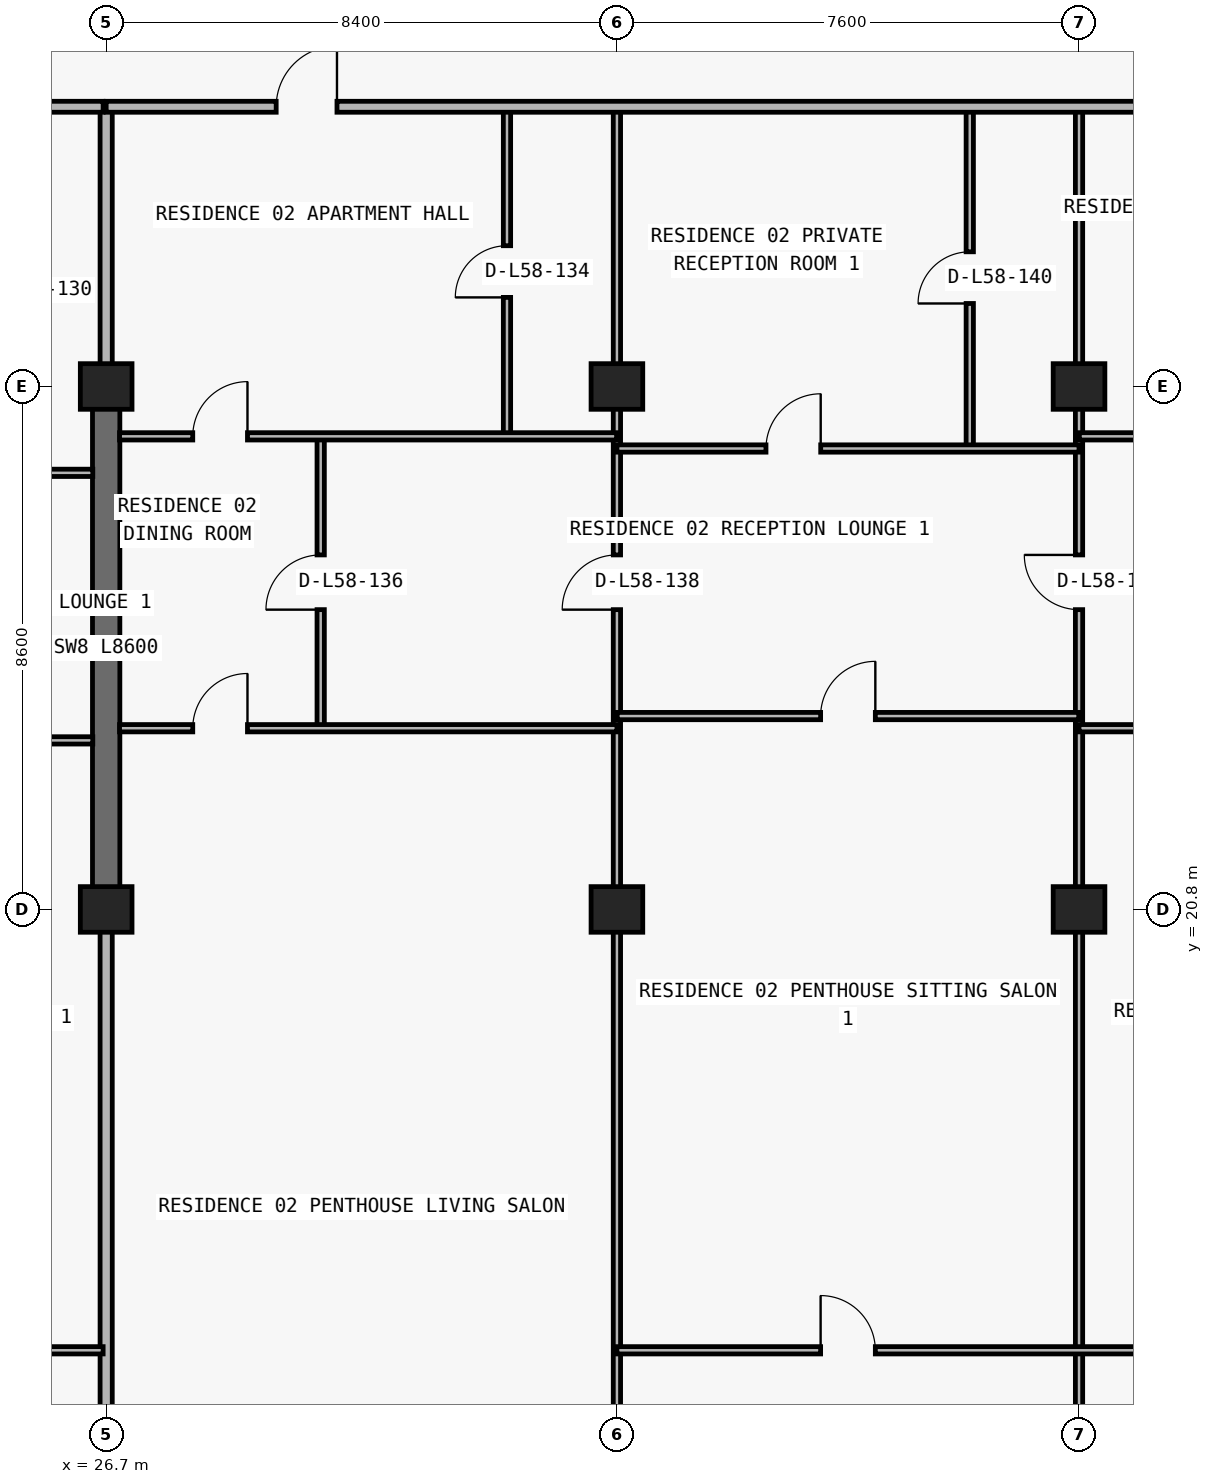
"""IFC4 building model, lengths in metres.
Left out: names, types, materials, properties, quantities, classifications, styles, units other than length and angle.
Written with IfcOpenShell. Run it as: python <this file> out.ifc"""

import sys

from ifc_helpers import new_model, si_unit, direction, frame, frame_2d, origin, origin_2d, place, context, subcontext, project, spatial, rectangle, extrude, element, fill, save


model = new_model("IFC4")
c1 = context("Model", 3, precision=1e-05, world=origin(), true_north=direction((0.0, 1.0)))
c2 = subcontext(c1, "Body", "Model", "MODEL_VIEW")
j1 = project(units=[si_unit("LENGTHUNIT", "METRE"), si_unit("PLANEANGLEUNIT", "RADIAN")], contexts=[c1])
p1 = place(None, origin())
s1 = spatial("IfcSite", under=j1, at=p1, CompositionType="ELEMENT")
p2 = place(p1, origin())
s2 = spatial("IfcBuilding", under=s1, at=p2, CompositionType="ELEMENT")
p3 = place(p2, frame((0.0, 0.0, 208.2)))
s3 = spatial("IfcBuildingStorey", under=s2, at=p3, CompositionType="ELEMENT", Elevation=208.2)
for number, where, z_axis, x_axis in (
    (1, (26.7, 20.8, 0.0), (0.0, 0.0, 1.0), (1.0, 0.0, 0.0)),
    (2, (35.1, 20.8, 0.0), (0.0, 0.0, 1.0), (1.0, 0.0, 0.0)),
    (3, (42.7, 20.8, 0.0), (0.0, 0.0, 1.0), (1.0, 0.0, 0.0)),
    (4, (26.7, 29.4, 0.0), (0.0, 0.0, 1.0), (1.0, 0.0, 0.0)),
    (5, (35.1, 29.4, 0.0), (0.0, 0.0, 1.0), (1.0, 0.0, 0.0)),
    (6, (42.7, 29.4, 0.0), (0.0, 0.0, 1.0), (1.0, 0.0, 0.0)),
):
    element("IfcColumn", number, at=place(p3, frame(where, z_axis=z_axis, x_axis=x_axis)), inside=s3, PredefinedType="COLUMN", context=c2, shape_type="SweptSolid", body=[
        extrude(rectangle(XDim=0.85, YDim=0.75, at=origin_2d()), origin(), (0.0, 0.0, 1.0), 3.05),
    ])
p4 = place(p3, frame((26.7, 20.8, 0.0), z_axis=(0.0, 0.0, 1.0), x_axis=(0.0, 1.0, 0.0)))
e7 = element("IfcWall", 7, at=p4, inside=s3, PredefinedType="SHEAR", context=c2, shape_type="SweptSolid", body=[
    extrude(rectangle(XDim=8.6, YDim=0.45, at=frame_2d((4.3, 0.0))), origin(), (0.0, 0.0, 1.0), 3.05),
])
p5 = place(p3, frame((26.7, 11.24, 0.0), z_axis=(0.0, 0.0, 1.0), x_axis=(0.0, 1.0, 0.0)))
e8 = element("IfcWall", 8, at=p5, inside=s3, PredefinedType="PARTITIONING", context=c2, shape_type="SweptSolid", body=[
    extrude(rectangle(XDim=9.555, YDim=0.2, at=frame_2d((4.777, 0.0))), origin(), (0.0, 0.0, 1.0), 2.263),
])
p6 = place(p3, frame((26.7, 29.405, 0.0), z_axis=(0.0, 0.0, 1.0), x_axis=(0.0, 1.0, 0.0)))
e9 = element("IfcWall", 9, at=p6, inside=s3, PredefinedType="PARTITIONING", context=c2, shape_type="SweptSolid", body=[
    extrude(rectangle(XDim=4.595, YDim=0.2, at=frame_2d((2.297, 0.0))), origin(), (0.0, 0.0, 1.0), 2.335),
])
p7 = place(p3, frame((30.228, 23.78, 0.0), z_axis=(0.0, 0.0, 1.0), x_axis=(0.0, 1.0, 0.0)))
e10 = element("IfcWall", 10, at=p7, inside=s3, PredefinedType="PARTITIONING", context=c2, shape_type="SweptSolid", body=[
    extrude(rectangle(XDim=4.8, YDim=0.12, at=frame_2d((2.4, 0.0))), origin(), (0.0, 0.0, 1.0), 3.05),
])
p8 = place(p7, frame((1.95, 0.0, 0.0)))
e11 = element("IfcOpeningElement", 11, at=p8, cuts=e10, PredefinedType="OPENING", context=c2, shape_type="SweptSolid", body=[
    extrude(rectangle(XDim=0.9, YDim=2.15, at=frame_2d((0.45, 1.075))), frame((0.0, 0.07, 0.0), z_axis=(0.0, -1.0, 0.0), x_axis=(1.0, 0.0, 0.0)), (0.0, 0.0, 1.0), 0.14),
])
p9 = place(p3, frame((33.292, 28.58, 0.0), z_axis=(0.0, 0.0, 1.0), x_axis=(0.0, 1.0, 0.0)))
e12 = element("IfcWall", 12, at=p9, inside=s3, PredefinedType="PARTITIONING", context=c2, shape_type="SweptSolid", body=[
    extrude(rectangle(XDim=5.42, YDim=0.12, at=frame_2d((2.71, 0.0))), origin(), (0.0, 0.0, 1.0), 3.05),
])
p10 = place(p9, frame((2.285, 0.0, 0.0)))
e13 = element("IfcOpeningElement", 13, at=p10, cuts=e12, PredefinedType="OPENING", context=c2, shape_type="SweptSolid", body=[
    extrude(rectangle(XDim=0.85, YDim=2.1, at=frame_2d((0.425, 1.05))), frame((0.0, 0.07, 0.0), z_axis=(0.0, -1.0, 0.0), x_axis=(1.0, 0.0, 0.0)), (0.0, 0.0, 1.0), 0.14),
])
p11 = place(p3, frame((35.1, 11.24, 0.0), z_axis=(0.0, 0.0, 1.0), x_axis=(0.0, 1.0, 0.0)))
e14 = element("IfcWall", 14, at=p11, inside=s3, PredefinedType="PARTITIONING", context=c2, shape_type="SweptSolid", body=[
    extrude(rectangle(XDim=22.76, YDim=0.12, at=frame_2d((11.38, 0.0))), origin(), (0.0, 0.0, 1.0), 2.263),
])
p12 = place(p11, frame((14.49, 0.0, 0.0)))
e15 = element("IfcOpeningElement", 15, at=p12, cuts=e14, PredefinedType="OPENING", context=c2, shape_type="SweptSolid", body=[
    extrude(rectangle(XDim=0.9, YDim=2.15, at=frame_2d((0.45, 1.075))), frame((0.0, 0.07, 0.0), z_axis=(0.0, -1.0, 0.0), x_axis=(1.0, 0.0, 0.0)), (0.0, 0.0, 1.0), 0.14),
])
p13 = place(p3, frame((40.903, 28.38, 0.0), z_axis=(0.0, 0.0, 1.0), x_axis=(0.0, 1.0, 0.0)))
e16 = element("IfcWall", 16, at=p13, inside=s3, PredefinedType="PARTITIONING", context=c2, shape_type="SweptSolid", body=[
    extrude(rectangle(XDim=5.62, YDim=0.12, at=frame_2d((2.81, 0.0))), origin(), (0.0, 0.0, 1.0), 3.05),
])
p14 = place(p13, frame((2.385, 0.0, 0.0)))
e17 = element("IfcOpeningElement", 17, at=p14, cuts=e16, PredefinedType="OPENING", context=c2, shape_type="SweptSolid", body=[
    extrude(rectangle(XDim=0.85, YDim=2.1, at=frame_2d((0.425, 1.05))), frame((0.0, 0.07, 0.0), z_axis=(0.0, -1.0, 0.0), x_axis=(1.0, 0.0, 0.0)), (0.0, 0.0, 1.0), 0.14),
])
p15 = place(p3, frame((42.7, 11.24, 0.0), z_axis=(0.0, 0.0, 1.0), x_axis=(0.0, 1.0, 0.0)))
e18 = element("IfcWall", 18, at=p15, inside=s3, PredefinedType="PARTITIONING", context=c2, shape_type="SweptSolid", body=[
    extrude(rectangle(XDim=22.76, YDim=0.12, at=frame_2d((11.38, 0.0))), origin(), (0.0, 0.0, 1.0), 2.263),
])
p16 = place(p15, frame((14.49, 0.0, 0.0)))
e19 = element("IfcOpeningElement", 19, at=p16, cuts=e18, PredefinedType="OPENING", context=c2, shape_type="SweptSolid", body=[
    extrude(rectangle(XDim=0.9, YDim=2.15, at=frame_2d((0.45, 1.075))), frame((0.0, 0.07, 0.0), z_axis=(0.0, -1.0, 0.0), x_axis=(1.0, 0.0, 0.0)), (0.0, 0.0, 1.0), 0.14),
])
p17 = place(p3, frame((18.3, 13.55, 0.0), z_axis=(0.0, 0.0, 1.0), x_axis=(1.0, 0.0, 0.0)))
e20 = element("IfcWall", 20, at=p17, inside=s3, PredefinedType="PARTITIONING", context=c2, shape_type="SweptSolid", body=[
    extrude(rectangle(XDim=8.35, YDim=0.12, at=frame_2d((4.175, 0.0))), origin(), (0.0, 0.0, 1.0), 3.05),
])
p18 = place(p17, frame((3.725, 0.0, 0.0)))
e21 = element("IfcOpeningElement", 21, at=p18, cuts=e20, PredefinedType="OPENING", context=c2, shape_type="SweptSolid", body=[
    extrude(rectangle(XDim=0.9, YDim=2.15, at=frame_2d((0.45, 1.075))), frame((0.0, 0.07, 0.0), z_axis=(0.0, -1.0, 0.0), x_axis=(1.0, 0.0, 0.0)), (0.0, 0.0, 1.0), 0.14),
])
p19 = place(p3, frame((35.1, 13.55, 0.0), z_axis=(0.0, 0.0, 1.0), x_axis=(1.0, 0.0, 0.0)))
e22 = element("IfcWall", 22, at=p19, inside=s3, PredefinedType="PARTITIONING", context=c2, shape_type="SweptSolid", body=[
    extrude(rectangle(XDim=16.0, YDim=0.12, at=frame_2d((8.0, 0.0))), origin(), (0.0, 0.0, 1.0), 3.05),
])
p20 = place(p19, frame((3.35, 0.0, 0.0)))
e23 = element("IfcOpeningElement", 23, at=p20, cuts=e22, PredefinedType="OPENING", context=c2, shape_type="SweptSolid", body=[
    extrude(rectangle(XDim=0.9, YDim=2.15, at=frame_2d((0.45, 1.075))), frame((0.0, 0.07, 0.0), z_axis=(0.0, -1.0, 0.0), x_axis=(1.0, 0.0, 0.0)), (0.0, 0.0, 1.0), 0.14),
])
p21 = place(p19, frame((11.35, 0.0, 0.0)))
e24 = element("IfcOpeningElement", 24, at=p21, cuts=e22, PredefinedType="OPENING", context=c2, shape_type="SweptSolid", body=[
    extrude(rectangle(XDim=0.9, YDim=2.15, at=frame_2d((0.45, 1.075))), frame((0.0, 0.07, 0.0), z_axis=(0.0, -1.0, 0.0), x_axis=(1.0, 0.0, 0.0)), (0.0, 0.0, 1.0), 0.14),
])
p22 = place(p3, frame((18.305, 23.58, 0.0), z_axis=(0.0, 0.0, 1.0), x_axis=(1.0, 0.0, 0.0)))
e25 = element("IfcWall", 25, at=p22, inside=s3, PredefinedType="PARTITIONING", context=c2, shape_type="SweptSolid", body=[
    extrude(rectangle(XDim=8.175, YDim=0.12, at=frame_2d((4.087, 0.0))), origin(), (0.0, 0.0, 1.0), 3.05),
])
p23 = place(p22, frame((3.637, 0.0, 0.0)))
e26 = element("IfcOpeningElement", 26, at=p23, cuts=e25, PredefinedType="OPENING", context=c2, shape_type="SweptSolid", body=[
    extrude(rectangle(XDim=0.9, YDim=2.15, at=frame_2d((0.45, 1.075))), frame((0.0, 0.07, 0.0), z_axis=(0.0, -1.0, 0.0), x_axis=(1.0, 0.0, 0.0)), (0.0, 0.0, 1.0), 0.14),
])
p24 = place(p3, frame((26.92, 23.78, 0.0), z_axis=(0.0, 0.0, 1.0), x_axis=(1.0, 0.0, 0.0)))
e27 = element("IfcWall", 27, at=p24, inside=s3, PredefinedType="PARTITIONING", context=c2, shape_type="SweptSolid", body=[
    extrude(rectangle(XDim=8.18, YDim=0.12, at=frame_2d((4.09, 0.0))), origin(), (0.0, 0.0, 1.0), 3.05),
])
p25 = place(p24, frame((1.204, 0.0, 0.0)))
e28 = element("IfcOpeningElement", 28, at=p25, cuts=e27, PredefinedType="OPENING", context=c2, shape_type="SweptSolid", body=[
    extrude(rectangle(XDim=0.9, YDim=2.15, at=frame_2d((0.45, 1.075))), frame((0.0, 0.07, 0.0), z_axis=(0.0, -1.0, 0.0), x_axis=(1.0, 0.0, 0.0)), (0.0, 0.0, 1.0), 0.14),
])
p26 = place(p3, frame((42.7, 23.78, 0.0), z_axis=(0.0, 0.0, 1.0), x_axis=(1.0, 0.0, 0.0)))
e29 = element("IfcWall", 29, at=p26, inside=s3, PredefinedType="PARTITIONING", context=c2, shape_type="SweptSolid", body=[
    extrude(rectangle(XDim=8.18, YDim=0.12, at=frame_2d((4.09, 0.0))), origin(), (0.0, 0.0, 1.0), 3.05),
])
p27 = place(p26, frame((3.64, 0.0, 0.0)))
e30 = element("IfcOpeningElement", 30, at=p27, cuts=e29, PredefinedType="OPENING", context=c2, shape_type="SweptSolid", body=[
    extrude(rectangle(XDim=0.9, YDim=2.15, at=frame_2d((0.45, 1.075))), frame((0.0, 0.07, 0.0), z_axis=(0.0, -1.0, 0.0), x_axis=(1.0, 0.0, 0.0)), (0.0, 0.0, 1.0), 0.14),
])
p28 = place(p3, frame((35.105, 23.98, 0.0), z_axis=(0.0, 0.0, 1.0), x_axis=(1.0, 0.0, 0.0)))
e31 = element("IfcWall", 31, at=p28, inside=s3, PredefinedType="PARTITIONING", context=c2, shape_type="SweptSolid", body=[
    extrude(rectangle(XDim=7.59, YDim=0.12, at=frame_2d((3.795, 0.0))), origin(), (0.0, 0.0, 1.0), 3.05),
])
p29 = place(p28, frame((3.345, 0.0, 0.0)))
e32 = element("IfcOpeningElement", 32, at=p29, cuts=e31, PredefinedType="OPENING", context=c2, shape_type="SweptSolid", body=[
    extrude(rectangle(XDim=0.9, YDim=2.15, at=frame_2d((0.45, 1.075))), frame((0.0, 0.07, 0.0), z_axis=(0.0, -1.0, 0.0), x_axis=(1.0, 0.0, 0.0)), (0.0, 0.0, 1.0), 0.14),
])
p30 = place(p3, frame((18.3, 27.98, 0.0), z_axis=(0.0, 0.0, 1.0), x_axis=(1.0, 0.0, 0.0)))
e33 = element("IfcWall", 33, at=p30, inside=s3, PredefinedType="PARTITIONING", context=c2, shape_type="SweptSolid", body=[
    extrude(rectangle(XDim=8.18, YDim=0.12, at=frame_2d((4.09, 0.0))), origin(), (0.0, 0.0, 1.0), 3.05),
])
p31 = place(p30, frame((2.952, 0.0, 0.0)))
e34 = element("IfcOpeningElement", 34, at=p31, cuts=e33, PredefinedType="OPENING", context=c2, shape_type="SweptSolid", body=[
    extrude(rectangle(XDim=0.9, YDim=2.15, at=frame_2d((0.45, 1.075))), frame((0.0, 0.07, 0.0), z_axis=(0.0, -1.0, 0.0), x_axis=(1.0, 0.0, 0.0)), (0.0, 0.0, 1.0), 0.14),
])
p32 = place(p3, frame((35.1, 28.38, 0.0), z_axis=(0.0, 0.0, 1.0), x_axis=(1.0, 0.0, 0.0)))
e35 = element("IfcWall", 35, at=p32, inside=s3, PredefinedType="PARTITIONING", context=c2, shape_type="SweptSolid", body=[
    extrude(rectangle(XDim=7.6, YDim=0.12, at=frame_2d((3.8, 0.0))), origin(), (0.0, 0.0, 1.0), 3.05),
])
p33 = place(p32, frame((2.451, 0.0, 0.0)))
e36 = element("IfcOpeningElement", 36, at=p33, cuts=e35, PredefinedType="OPENING", context=c2, shape_type="SweptSolid", body=[
    extrude(rectangle(XDim=0.9, YDim=2.15, at=frame_2d((0.45, 1.075))), frame((0.0, 0.07, 0.0), z_axis=(0.0, -1.0, 0.0), x_axis=(1.0, 0.0, 0.0)), (0.0, 0.0, 1.0), 0.14),
])
p34 = place(p3, frame((26.92, 28.58, 0.0), z_axis=(0.0, 0.0, 1.0), x_axis=(1.0, 0.0, 0.0)))
e37 = element("IfcWall", 37, at=p34, inside=s3, PredefinedType="PARTITIONING", context=c2, shape_type="SweptSolid", body=[
    extrude(rectangle(XDim=8.175, YDim=0.12, at=frame_2d((4.087, 0.0))), origin(), (0.0, 0.0, 1.0), 3.05),
])
p35 = place(p34, frame((1.204, 0.0, 0.0)))
e38 = element("IfcOpeningElement", 38, at=p35, cuts=e37, PredefinedType="OPENING", context=c2, shape_type="SweptSolid", body=[
    extrude(rectangle(XDim=0.9, YDim=2.15, at=frame_2d((0.45, 1.075))), frame((0.0, 0.07, 0.0), z_axis=(0.0, -1.0, 0.0), x_axis=(1.0, 0.0, 0.0)), (0.0, 0.0, 1.0), 0.14),
])
p36 = place(p3, frame((42.705, 28.58, 0.0), z_axis=(0.0, 0.0, 1.0), x_axis=(1.0, 0.0, 0.0)))
e39 = element("IfcWall", 39, at=p36, inside=s3, PredefinedType="PARTITIONING", context=c2, shape_type="SweptSolid", body=[
    extrude(rectangle(XDim=8.175, YDim=0.12, at=frame_2d((4.087, 0.0))), origin(), (0.0, 0.0, 1.0), 3.05),
])
p37 = place(p36, frame((2.862, 0.0, 0.0)))
e40 = element("IfcOpeningElement", 40, at=p37, cuts=e39, PredefinedType="OPENING", context=c2, shape_type="SweptSolid", body=[
    extrude(rectangle(XDim=0.9, YDim=2.15, at=frame_2d((0.45, 1.075))), frame((0.0, 0.07, 0.0), z_axis=(0.0, -1.0, 0.0), x_axis=(1.0, 0.0, 0.0)), (0.0, 0.0, 1.0), 0.14),
])
p38 = place(p3, frame((10.105, 34.0, 0.0), z_axis=(0.0, 0.0, 1.0), x_axis=(1.0, 0.0, 0.0)))
e41 = element("IfcWall", 41, at=p38, inside=s3, PredefinedType="PARTITIONING", context=c2, shape_type="SweptSolid", body=[
    extrude(rectangle(XDim=16.545, YDim=0.18, at=frame_2d((8.272, 0.0))), origin(), (0.0, 0.0, 1.0), 3.05),
])
p39 = place(p38, frame((2.712, 0.0, 0.0)))
e42 = element("IfcOpeningElement", 42, at=p39, cuts=e41, PredefinedType="OPENING", context=c2, shape_type="SweptSolid", body=[
    extrude(rectangle(XDim=1.0, YDim=2.2, at=frame_2d((0.5, 1.1))), frame((0.0, 0.1, 0.0), z_axis=(0.0, -1.0, 0.0), x_axis=(1.0, 0.0, 0.0)), (0.0, 0.0, 1.0), 0.2),
])
p40 = place(p3, frame((26.7, 34.0, 0.0), z_axis=(0.0, 0.0, 1.0), x_axis=(1.0, 0.0, 0.0)))
e43 = element("IfcWall", 43, at=p40, inside=s3, PredefinedType="PARTITIONING", context=c2, shape_type="SweptSolid", body=[
    extrude(rectangle(XDim=41.0, YDim=0.18, at=frame_2d((20.5, 0.0))), origin(), (0.0, 0.0, 1.0), 3.05),
])
p41 = place(p40, frame((2.796, 0.0, 0.0)))
e44 = element("IfcOpeningElement", 44, at=p41, cuts=e43, PredefinedType="OPENING", context=c2, shape_type="SweptSolid", body=[
    extrude(rectangle(XDim=1.0, YDim=2.2, at=frame_2d((0.5, 1.1))), frame((0.0, 0.1, 0.0), z_axis=(0.0, -1.0, 0.0), x_axis=(1.0, 0.0, 0.0)), (0.0, 0.0, 1.0), 0.2),
])
p42 = place(p40, frame((27.199, 0.0, 0.0)))
e45 = element("IfcOpeningElement", 45, at=p42, cuts=e43, PredefinedType="OPENING", context=c2, shape_type="SweptSolid", body=[
    extrude(rectangle(XDim=1.0, YDim=2.2, at=frame_2d((0.5, 1.1))), frame((0.0, 0.1, 0.0), z_axis=(0.0, -1.0, 0.0), x_axis=(1.0, 0.0, 0.0)), (0.0, 0.0, 1.0), 0.2),
])
p43 = place(p41, origin())
e46 = element("IfcDoor", 46, at=p43, inside=s3, OperationType="SINGLE_SWING_RIGHT", PredefinedType="DOOR", context=c2, shape_type="SweptSolid", body=[
    extrude(rectangle(XDim=1.0, YDim=2.2, at=frame_2d((0.5, 1.1))), frame((0.0, 0.025, 0.0), z_axis=(0.0, -1.0, 0.0), x_axis=(1.0, 0.0, 0.0)), (0.0, 0.0, 1.0), 0.05),
])
fill(e44, e46)
p44 = place(p10, origin())
e47 = element("IfcDoor", 47, at=p44, inside=s3, OperationType="SINGLE_SWING_LEFT", PredefinedType="DOOR", context=c2, shape_type="SweptSolid", body=[
    extrude(rectangle(XDim=0.85, YDim=2.1, at=frame_2d((0.425, 1.05))), frame((0.0, 0.025, 0.0), z_axis=(0.0, -1.0, 0.0), x_axis=(1.0, 0.0, 0.0)), (0.0, 0.0, 1.0), 0.05),
])
fill(e13, e47)
p45 = place(p35, origin())
e48 = element("IfcDoor", 48, at=p45, inside=s3, OperationType="SINGLE_SWING_RIGHT", PredefinedType="DOOR", context=c2, shape_type="SweptSolid", body=[
    extrude(rectangle(XDim=0.9, YDim=2.15, at=frame_2d((0.45, 1.075))), frame((0.0, 0.025, 0.0), z_axis=(0.0, -1.0, 0.0), x_axis=(1.0, 0.0, 0.0)), (0.0, 0.0, 1.0), 0.05),
])
fill(e38, e48)
p46 = place(p8, origin())
e49 = element("IfcDoor", 49, at=p46, inside=s3, OperationType="SINGLE_SWING_LEFT", PredefinedType="DOOR", context=c2, shape_type="SweptSolid", body=[
    extrude(rectangle(XDim=0.9, YDim=2.15, at=frame_2d((0.45, 1.075))), frame((0.0, 0.025, 0.0), z_axis=(0.0, -1.0, 0.0), x_axis=(1.0, 0.0, 0.0)), (0.0, 0.0, 1.0), 0.05),
])
fill(e11, e49)
p47 = place(p25, origin())
e50 = element("IfcDoor", 50, at=p47, inside=s3, OperationType="SINGLE_SWING_RIGHT", PredefinedType="DOOR", context=c2, shape_type="SweptSolid", body=[
    extrude(rectangle(XDim=0.9, YDim=2.15, at=frame_2d((0.45, 1.075))), frame((0.0, 0.025, 0.0), z_axis=(0.0, -1.0, 0.0), x_axis=(1.0, 0.0, 0.0)), (0.0, 0.0, 1.0), 0.05),
])
fill(e28, e50)
p48 = place(p12, origin())
e51 = element("IfcDoor", 51, at=p48, inside=s3, OperationType="SINGLE_SWING_LEFT", PredefinedType="DOOR", context=c2, shape_type="SweptSolid", body=[
    extrude(rectangle(XDim=0.9, YDim=2.15, at=frame_2d((0.45, 1.075))), frame((0.0, 0.025, 0.0), z_axis=(0.0, -1.0, 0.0), x_axis=(1.0, 0.0, 0.0)), (0.0, 0.0, 1.0), 0.05),
])
fill(e15, e51)
p49 = place(p33, origin())
e52 = element("IfcDoor", 52, at=p49, inside=s3, OperationType="SINGLE_SWING_RIGHT", PredefinedType="DOOR", context=c2, shape_type="SweptSolid", body=[
    extrude(rectangle(XDim=0.9, YDim=2.15, at=frame_2d((0.45, 1.075))), frame((0.0, 0.025, 0.0), z_axis=(0.0, -1.0, 0.0), x_axis=(1.0, 0.0, 0.0)), (0.0, 0.0, 1.0), 0.05),
])
fill(e36, e52)
p50 = place(p14, origin())
e53 = element("IfcDoor", 53, at=p50, inside=s3, OperationType="SINGLE_SWING_LEFT", PredefinedType="DOOR", context=c2, shape_type="SweptSolid", body=[
    extrude(rectangle(XDim=0.85, YDim=2.1, at=frame_2d((0.425, 1.05))), frame((0.0, 0.025, 0.0), z_axis=(0.0, -1.0, 0.0), x_axis=(1.0, 0.0, 0.0)), (0.0, 0.0, 1.0), 0.05),
])
fill(e17, e53)
p51 = place(p29, origin())
e54 = element("IfcDoor", 54, at=p51, inside=s3, OperationType="SINGLE_SWING_RIGHT", PredefinedType="DOOR", context=c2, shape_type="SweptSolid", body=[
    extrude(rectangle(XDim=0.9, YDim=2.15, at=frame_2d((0.45, 1.075))), frame((0.0, 0.025, 0.0), z_axis=(0.0, -1.0, 0.0), x_axis=(1.0, 0.0, 0.0)), (0.0, 0.0, 1.0), 0.05),
])
fill(e32, e54)
p52 = place(p20, origin())
e55 = element("IfcDoor", 55, at=p52, inside=s3, OperationType="SINGLE_SWING_LEFT", PredefinedType="DOOR", context=c2, shape_type="SweptSolid", body=[
    extrude(rectangle(XDim=0.9, YDim=2.15, at=frame_2d((0.45, 1.075))), frame((0.0, 0.025, 0.0), z_axis=(0.0, -1.0, 0.0), x_axis=(1.0, 0.0, 0.0)), (0.0, 0.0, 1.0), 0.05),
])
fill(e23, e55)
p53 = place(p16, origin())
e56 = element("IfcDoor", 56, at=p53, inside=s3, OperationType="SINGLE_SWING_RIGHT", PredefinedType="DOOR", context=c2, shape_type="SweptSolid", body=[
    extrude(rectangle(XDim=0.9, YDim=2.15, at=frame_2d((0.45, 1.075))), frame((0.0, 0.025, 0.0), z_axis=(0.0, -1.0, 0.0), x_axis=(1.0, 0.0, 0.0)), (0.0, 0.0, 1.0), 0.05),
])
fill(e19, e56)
save(model, sys.argv[1])
